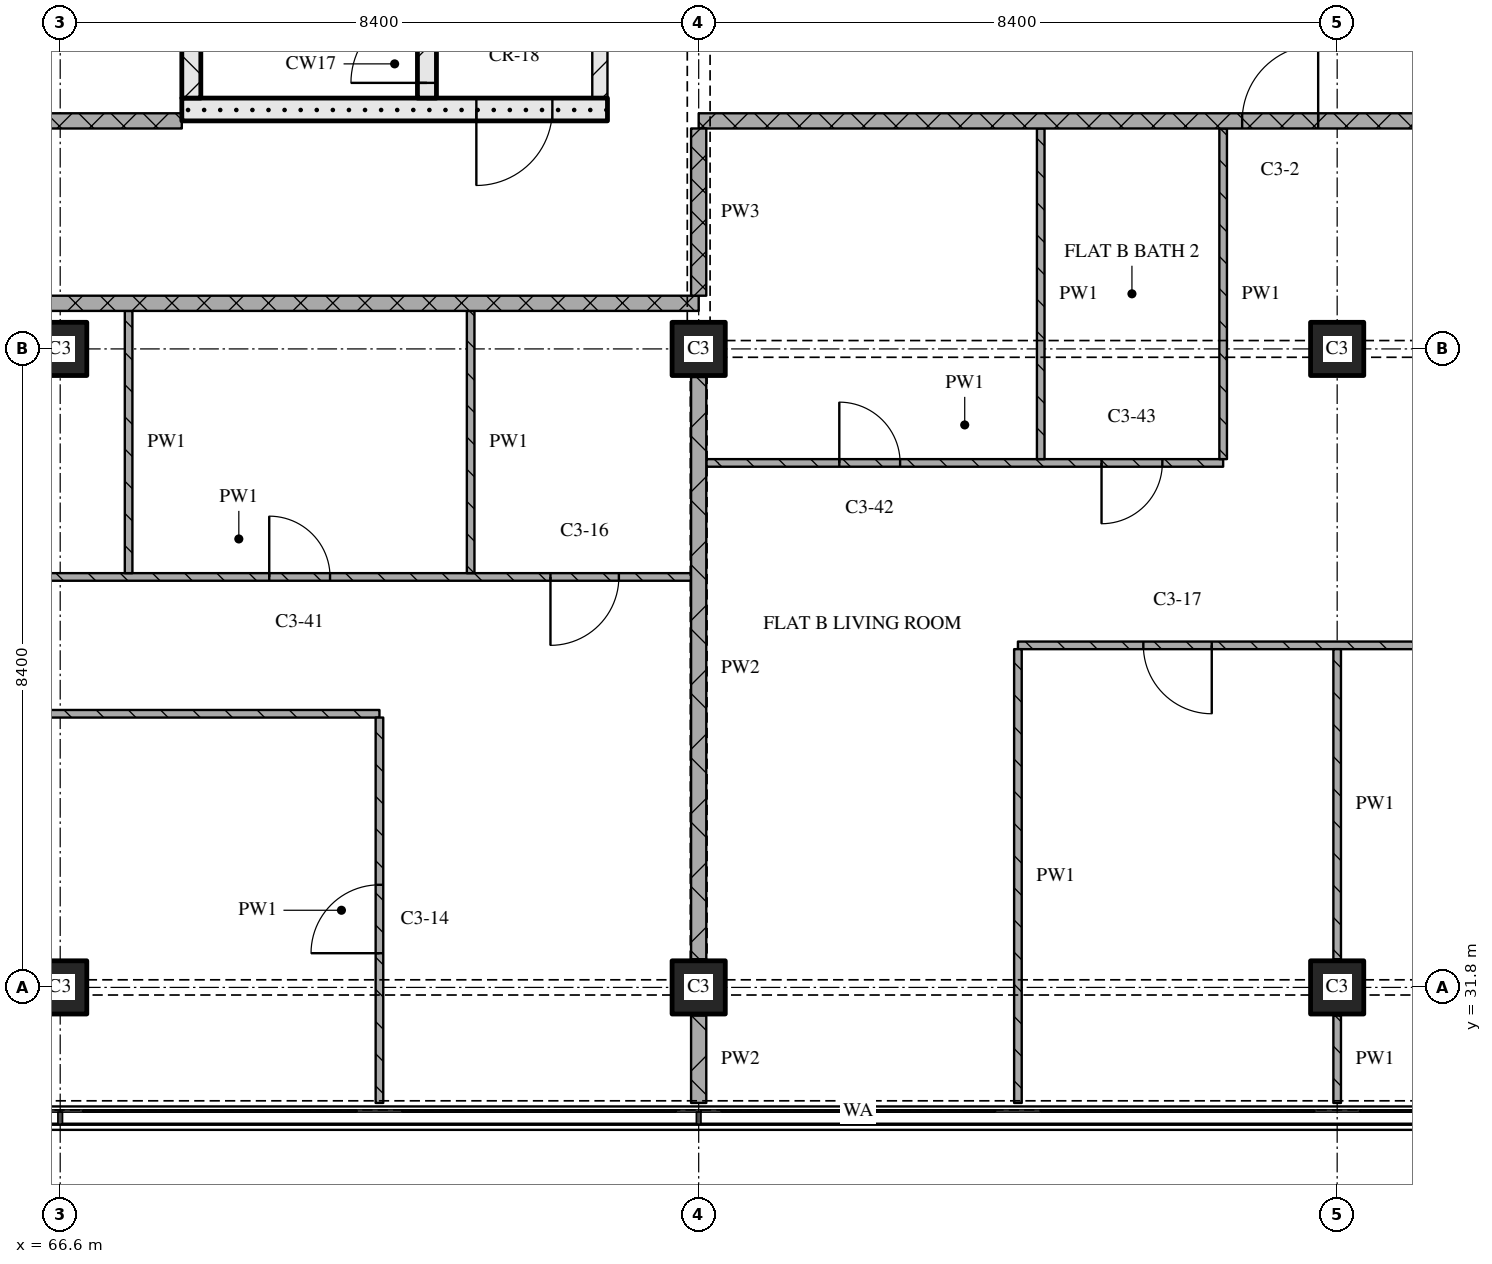
"""IFC4 building model, lengths in metres.
Left out: names, types, materials, properties, quantities, classifications, styles, units other than length and angle.
Written with IfcOpenShell. Run it as: python <this file> out.ifc"""

import sys

from ifc_helpers import new_model, si_unit, direction, frame, frame_2d, origin, origin_2d, place, context, subcontext, project, spatial, rectangle, extrude, element, fill, save


model = new_model("IFC4")
c1 = context("Model", 3, precision=1e-05, world=origin(), true_north=direction((0.0, 1.0)))
c2 = subcontext(c1, "Body", "Model", "MODEL_VIEW")
j1 = project(units=[si_unit("LENGTHUNIT", "METRE"), si_unit("PLANEANGLEUNIT", "RADIAN")], contexts=[c1])
p1 = place(None, origin())
s1 = spatial("IfcSite", under=j1, at=p1, CompositionType="ELEMENT")
p2 = place(p1, origin())
s2 = spatial("IfcBuilding", under=s1, at=p2, CompositionType="ELEMENT")
p3 = place(p2, frame((0.0, 0.0, 172.65)))
s3 = spatial("IfcBuildingStorey", under=s2, at=p3, CompositionType="ELEMENT", Elevation=172.65)
for number, where, z_axis, x_axis in (
    (1, (66.6, 31.8, 0.0), (0.0, 0.0, 1.0), (1.0, 0.0, 0.0)),
    (2, (66.6, 40.2, 0.0), (0.0, 0.0, 1.0), (1.0, 0.0, 0.0)),
    (3, (75.0, 31.8, 0.0), (0.0, 0.0, 1.0), (1.0, 0.0, 0.0)),
    (4, (75.0, 40.2, 0.0), (0.0, 0.0, 1.0), (1.0, 0.0, 0.0)),
    (5, (83.4, 31.8, 0.0), (0.0, 0.0, 1.0), (1.0, 0.0, 0.0)),
    (6, (83.4, 40.2, 0.0), (0.0, 0.0, 1.0), (1.0, 0.0, 0.0)),
):
    element("IfcColumn", number, at=place(p3, frame(where, z_axis=z_axis, x_axis=x_axis)), inside=s3, PredefinedType="COLUMN", context=c2, shape_type="SweptSolid", body=[
        extrude(rectangle(XDim=0.7, YDim=0.7, at=origin_2d()), origin(), (0.0, 0.0, 1.0), 3.6),
    ])
p4 = place(p3, frame((68.2, 43.35, 0.0), z_axis=(0.0, 0.0, 1.0), x_axis=(1.0, 0.0, 0.0)))
e7 = element("IfcWall", 7, at=p4, inside=s3, PredefinedType="SOLIDWALL", context=c2, shape_type="SweptSolid", body=[
    extrude(rectangle(XDim=5.6, YDim=0.3, at=frame_2d((2.8, 0.0))), origin(), (0.0, 0.0, 1.0), 3.32),
])
p5 = place(p4, frame((3.875, 0.0, 0.0)))
e8 = element("IfcOpeningElement", 8, at=p5, cuts=e7, PredefinedType="OPENING", context=c2, shape_type="SweptSolid", body=[
    extrude(rectangle(XDim=1.0, YDim=2.1, at=frame_2d((0.5, 1.05))), frame((0.0, 0.16, 0.0), z_axis=(0.0, -1.0, 0.0), x_axis=(1.0, 0.0, 0.0)), (0.0, 0.0, 1.0), 0.32),
])
p6 = place(p3, frame((68.325, 43.5, 0.0), z_axis=(0.0, 0.0, 1.0), x_axis=(0.0, 1.0, 0.0)))
e9 = element("IfcWall", 9, at=p6, inside=s3, PredefinedType="SOLIDWALL", context=c2, shape_type="SweptSolid", body=[
    extrude(rectangle(XDim=6.9, YDim=0.25, at=frame_2d((3.45, 0.0))), origin(), (0.0, 0.0, 1.0), 3.32),
])
p7 = place(p3, frame((71.425, 43.5, 0.0), z_axis=(0.0, 0.0, 1.0), x_axis=(0.0, 1.0, 0.0)))
e10 = element("IfcWall", 10, at=p7, inside=s3, PredefinedType="SOLIDWALL", context=c2, shape_type="SweptSolid", body=[
    extrude(rectangle(XDim=6.9, YDim=0.25, at=frame_2d((3.45, 0.0))), origin(), (0.0, 0.0, 1.0), 3.32),
])
p8 = place(p7, frame((0.2, 0.0, 0.0)))
e11 = element("IfcOpeningElement", 11, at=p8, cuts=e10, PredefinedType="OPENING", context=c2, shape_type="SweptSolid", body=[
    extrude(rectangle(XDim=1.0, YDim=2.1, at=frame_2d((0.5, 1.05))), frame((0.0, 0.135, 0.0), z_axis=(0.0, -1.0, 0.0), x_axis=(1.0, 0.0, 0.0)), (0.0, 0.0, 1.0), 0.27),
])
p9 = place(p3, frame((73.7, 43.5, 0.0), z_axis=(0.0, 0.0, 1.0), x_axis=(0.0, 1.0, 0.0)))
e12 = element("IfcWall", 12, at=p9, inside=s3, PredefinedType="PARTITIONING", context=c2, shape_type="SweptSolid", body=[
    extrude(rectangle(XDim=6.9, YDim=0.2, at=frame_2d((3.45, 0.0))), origin(), (0.0, 0.0, 1.0), 3.32),
])
p10 = place(p9, frame((1.0, 0.0, 0.0)))
e13 = element("IfcOpeningElement", 13, at=p10, cuts=e12, PredefinedType="OPENING", context=c2, shape_type="SweptSolid", body=[
    extrude(rectangle(XDim=1.0, YDim=2.1, at=frame_2d((0.5, 1.05))), frame((0.0, 0.11, 0.0), z_axis=(0.0, -1.0, 0.0), x_axis=(1.0, 0.0, 0.0)), (0.0, 0.0, 1.0), 0.22),
])
p11 = place(p3, frame((70.8, 35.4, 0.0), z_axis=(0.0, 0.0, 1.0), x_axis=(-1.0, 0.0, 0.0)))
e14 = element("IfcWall", 14, at=p11, inside=s3, PredefinedType="PARTITIONING", context=c2, shape_type="SweptSolid", body=[
    extrude(rectangle(XDim=22.52, YDim=0.1, at=frame_2d((11.26, 0.0))), origin(), (0.0, 0.0, 1.0), 3.32),
])
p12 = place(p11, frame((10.05, 0.0, 0.0)))
e15 = element("IfcOpeningElement", 15, at=p12, cuts=e14, PredefinedType="OPENING", context=c2, shape_type="SweptSolid", body=[
    extrude(rectangle(XDim=0.9, YDim=2.1, at=frame_2d((0.45, 1.05))), frame((0.0, 0.06, 0.0), z_axis=(0.0, -1.0, 0.0), x_axis=(1.0, 0.0, 0.0)), (0.0, 0.0, 1.0), 0.12),
])
p13 = place(p11, frame((14.25, 0.0, 0.0)))
e16 = element("IfcOpeningElement", 16, at=p13, cuts=e14, PredefinedType="OPENING", context=c2, shape_type="SweptSolid", body=[
    extrude(rectangle(XDim=0.9, YDim=2.1, at=frame_2d((0.45, 1.05))), frame((0.0, 0.06, 0.0), z_axis=(0.0, -1.0, 0.0), x_axis=(1.0, 0.0, 0.0)), (0.0, 0.0, 1.0), 0.12),
])
p14 = place(p11, frame((18.274, 0.0, 0.0)))
e17 = element("IfcOpeningElement", 17, at=p14, cuts=e14, PredefinedType="OPENING", context=c2, shape_type="SweptSolid", body=[
    extrude(rectangle(XDim=0.9, YDim=2.1, at=frame_2d((0.45, 1.05))), frame((0.0, 0.06, 0.0), z_axis=(0.0, -1.0, 0.0), x_axis=(1.0, 0.0, 0.0)), (0.0, 0.0, 1.0), 0.12),
])
p15 = place(p3, frame((91.7, 36.3, 0.0), z_axis=(0.0, 0.0, 1.0), x_axis=(-1.0, 0.0, 0.0)))
e18 = element("IfcWall", 18, at=p15, inside=s3, PredefinedType="PARTITIONING", context=c2, shape_type="SweptSolid", body=[
    extrude(rectangle(XDim=12.5, YDim=0.1, at=frame_2d((6.25, 0.0))), origin(), (0.0, 0.0, 1.0), 3.32),
])
p16 = place(p15, frame((3.65, 0.0, 0.0)))
e19 = element("IfcOpeningElement", 19, at=p16, cuts=e18, PredefinedType="OPENING", context=c2, shape_type="SweptSolid", body=[
    extrude(rectangle(XDim=0.9, YDim=2.1, at=frame_2d((0.45, 1.05))), frame((0.0, 0.06, 0.0), z_axis=(0.0, -1.0, 0.0), x_axis=(1.0, 0.0, 0.0)), (0.0, 0.0, 1.0), 0.12),
])
p17 = place(p15, frame((9.95, 0.0, 0.0)))
e20 = element("IfcOpeningElement", 20, at=p17, cuts=e18, PredefinedType="OPENING", context=c2, shape_type="SweptSolid", body=[
    extrude(rectangle(XDim=0.9, YDim=2.1, at=frame_2d((0.45, 1.05))), frame((0.0, 0.06, 0.0), z_axis=(0.0, -1.0, 0.0), x_axis=(1.0, 0.0, 0.0)), (0.0, 0.0, 1.0), 0.12),
])
p18 = place(p3, frame((63.0, 37.2, 0.0), z_axis=(0.0, 0.0, 1.0), x_axis=(1.0, 0.0, 0.0)))
e21 = element("IfcWall", 21, at=p18, inside=s3, PredefinedType="PARTITIONING", context=c2, shape_type="SweptSolid", body=[
    extrude(rectangle(XDim=11.9, YDim=0.1, at=frame_2d((5.95, 0.0))), origin(), (0.0, 0.0, 1.0), 3.32),
])
p19 = place(p18, frame((6.35, 0.0, 0.0)))
e22 = element("IfcOpeningElement", 22, at=p19, cuts=e21, PredefinedType="OPENING", context=c2, shape_type="SweptSolid", body=[
    extrude(rectangle(XDim=0.8, YDim=2.1, at=frame_2d((0.4, 1.05))), frame((0.0, 0.06, 0.0), z_axis=(0.0, -1.0, 0.0), x_axis=(1.0, 0.0, 0.0)), (0.0, 0.0, 1.0), 0.12),
])
p20 = place(p18, frame((10.05, 0.0, 0.0)))
e23 = element("IfcOpeningElement", 23, at=p20, cuts=e21, PredefinedType="OPENING", context=c2, shape_type="SweptSolid", body=[
    extrude(rectangle(XDim=0.9, YDim=2.1, at=frame_2d((0.45, 1.05))), frame((0.0, 0.06, 0.0), z_axis=(0.0, -1.0, 0.0), x_axis=(1.0, 0.0, 0.0)), (0.0, 0.0, 1.0), 0.12),
])
p21 = place(p3, frame((75.1, 38.7, 0.0), z_axis=(0.0, 0.0, 1.0), x_axis=(1.0, 0.0, 0.0)))
e24 = element("IfcWall", 24, at=p21, inside=s3, PredefinedType="PARTITIONING", context=c2, shape_type="SweptSolid", body=[
    extrude(rectangle(XDim=6.8, YDim=0.1, at=frame_2d((3.4, 0.0))), origin(), (0.0, 0.0, 1.0), 3.32),
])
p22 = place(p21, frame((1.75, 0.0, 0.0)))
e25 = element("IfcOpeningElement", 25, at=p22, cuts=e24, PredefinedType="OPENING", context=c2, shape_type="SweptSolid", body=[
    extrude(rectangle(XDim=0.8, YDim=2.1, at=frame_2d((0.4, 1.05))), frame((0.0, 0.06, 0.0), z_axis=(0.0, -1.0, 0.0), x_axis=(1.0, 0.0, 0.0)), (0.0, 0.0, 1.0), 0.12),
])
p23 = place(p21, frame((5.2, 0.0, 0.0)))
e26 = element("IfcOpeningElement", 26, at=p23, cuts=e24, PredefinedType="OPENING", context=c2, shape_type="SweptSolid", body=[
    extrude(rectangle(XDim=0.8, YDim=2.1, at=frame_2d((0.4, 1.05))), frame((0.0, 0.06, 0.0), z_axis=(0.0, -1.0, 0.0), x_axis=(1.0, 0.0, 0.0)), (0.0, 0.0, 1.0), 0.12),
])
p24 = place(p3, frame((75.0, 40.8, 0.0), z_axis=(0.0, 0.0, 1.0), x_axis=(-1.0, 0.0, 0.0)))
e27 = element("IfcWall", 27, at=p24, inside=s3, PredefinedType="PARTITIONING", context=c2, shape_type="SweptSolid", body=[
    extrude(rectangle(XDim=24.28, YDim=0.2, at=frame_2d((12.14, 0.0))), origin(), (0.0, 0.0, 1.0), 3.32),
])
p25 = place(p24, frame((12.25, 0.0, 0.0)))
e28 = element("IfcOpeningElement", 28, at=p25, cuts=e27, PredefinedType="OPENING", context=c2, shape_type="SweptSolid", body=[
    extrude(rectangle(XDim=1.0, YDim=2.1, at=frame_2d((0.5, 1.05))), frame((0.0, 0.11, 0.0), z_axis=(0.0, -1.0, 0.0), x_axis=(1.0, 0.0, 0.0)), (0.0, 0.0, 1.0), 0.22),
])
p26 = place(p3, frame((63.0, 43.2, 0.0), z_axis=(0.0, 0.0, 1.0), x_axis=(1.0, 0.0, 0.0)))
e29 = element("IfcWall", 29, at=p26, inside=s3, PredefinedType="PARTITIONING", context=c2, shape_type="SweptSolid", body=[
    extrude(rectangle(XDim=5.2, YDim=0.2, at=frame_2d((2.6, 0.0))), origin(), (0.0, 0.0, 1.0), 3.32),
])
p27 = place(p3, frame((100.2, 43.2, 0.0), z_axis=(0.0, 0.0, 1.0), x_axis=(-1.0, 0.0, 0.0)))
e30 = element("IfcWall", 30, at=p27, inside=s3, PredefinedType="PARTITIONING", context=c2, shape_type="SweptSolid", body=[
    extrude(rectangle(XDim=25.2, YDim=0.2, at=frame_2d((12.6, 0.0))), origin(), (0.0, 0.0, 1.0), 3.32),
])
p28 = place(p27, frame((4.45, 0.0, 0.0)))
e31 = element("IfcOpeningElement", 31, at=p28, cuts=e30, PredefinedType="OPENING", context=c2, shape_type="SweptSolid", body=[
    extrude(rectangle(XDim=1.0, YDim=2.1, at=frame_2d((0.5, 1.05))), frame((0.0, 0.11, 0.0), z_axis=(0.0, -1.0, 0.0), x_axis=(1.0, 0.0, 0.0)), (0.0, 0.0, 1.0), 0.22),
])
p29 = place(p27, frame((17.05, 0.0, 0.0)))
e32 = element("IfcOpeningElement", 32, at=p29, cuts=e30, PredefinedType="OPENING", context=c2, shape_type="SweptSolid", body=[
    extrude(rectangle(XDim=1.0, YDim=2.1, at=frame_2d((0.5, 1.05))), frame((0.0, 0.11, 0.0), z_axis=(0.0, -1.0, 0.0), x_axis=(1.0, 0.0, 0.0)), (0.0, 0.0, 1.0), 0.22),
])
p30 = place(p3, frame((67.5, 40.7, 0.0), z_axis=(0.0, 0.0, 1.0), x_axis=(0.0, -1.0, 0.0)))
e33 = element("IfcWall", 33, at=p30, inside=s3, PredefinedType="PARTITIONING", context=c2, shape_type="SweptSolid", body=[
    extrude(rectangle(XDim=3.45, YDim=0.1, at=frame_2d((1.725, 0.0))), origin(), (0.0, 0.0, 1.0), 3.32),
])
p31 = place(p3, frame((70.8, 30.28, 0.0), z_axis=(0.0, 0.0, 1.0), x_axis=(0.0, 1.0, 0.0)))
e34 = element("IfcWall", 34, at=p31, inside=s3, PredefinedType="PARTITIONING", context=c2, shape_type="SweptSolid", body=[
    extrude(rectangle(XDim=5.07, YDim=0.1, at=frame_2d((2.535, 0.0))), origin(), (0.0, 0.0, 1.0), 3.32),
])
p32 = place(p31, frame((1.97, 0.0, 0.0)))
e35 = element("IfcOpeningElement", 35, at=p32, cuts=e34, PredefinedType="OPENING", context=c2, shape_type="SweptSolid", body=[
    extrude(rectangle(XDim=0.9, YDim=2.1, at=frame_2d((0.45, 1.05))), frame((0.0, 0.06, 0.0), z_axis=(0.0, -1.0, 0.0), x_axis=(1.0, 0.0, 0.0)), (0.0, 0.0, 1.0), 0.12),
])
p33 = place(p3, frame((72.0, 40.7, 0.0), z_axis=(0.0, 0.0, 1.0), x_axis=(0.0, -1.0, 0.0)))
e36 = element("IfcWall", 36, at=p33, inside=s3, PredefinedType="PARTITIONING", context=c2, shape_type="SweptSolid", body=[
    extrude(rectangle(XDim=3.45, YDim=0.1, at=frame_2d((1.725, 0.0))), origin(), (0.0, 0.0, 1.0), 3.32),
])
p34 = place(p3, frame((75.0, 43.1, 0.0), z_axis=(0.0, 0.0, 1.0), x_axis=(0.0, -1.0, 0.0)))
e37 = element("IfcWall", 37, at=p34, inside=s3, PredefinedType="PARTITIONING", context=c2, shape_type="SweptSolid", body=[
    extrude(rectangle(XDim=2.2, YDim=0.2, at=frame_2d((1.1, 0.0))), origin(), (0.0, 0.0, 1.0), 2.43),
])
p35 = place(p3, frame((75.0, 31.43, 0.0), z_axis=(0.0, 0.0, 1.0), x_axis=(0.0, -1.0, 0.0)))
e38 = element("IfcWall", 38, at=p35, inside=s3, PredefinedType="PARTITIONING", context=c2, shape_type="SweptSolid", body=[
    extrude(rectangle(XDim=1.15, YDim=0.2, at=frame_2d((0.575, 0.0))), origin(), (0.0, 0.0, 1.0), 3.32),
])
p36 = place(p3, frame((75.0, 39.83, 0.0), z_axis=(0.0, 0.0, 1.0), x_axis=(0.0, -1.0, 0.0)))
e39 = element("IfcWall", 39, at=p36, inside=s3, PredefinedType="PARTITIONING", context=c2, shape_type="SweptSolid", body=[
    extrude(rectangle(XDim=7.66, YDim=0.2, at=frame_2d((3.83, 0.0))), origin(), (0.0, 0.0, 1.0), 2.72),
])
p37 = place(p3, frame((79.2, 36.25, 0.0), z_axis=(0.0, 0.0, 1.0), x_axis=(0.0, -1.0, 0.0)))
e40 = element("IfcWall", 40, at=p37, inside=s3, PredefinedType="PARTITIONING", context=c2, shape_type="SweptSolid", body=[
    extrude(rectangle(XDim=5.97, YDim=0.1, at=frame_2d((2.985, 0.0))), origin(), (0.0, 0.0, 1.0), 3.32),
])
for number, where, z_axis, x_axis in (
    (41, (79.5, 43.1, 0.0), (0.0, 0.0, 1.0), (0.0, -1.0, 0.0)),
    (42, (81.9, 43.1, 0.0), (0.0, 0.0, 1.0), (0.0, -1.0, 0.0)),
):
    element("IfcWall", number, at=place(p3, frame(where, z_axis=z_axis, x_axis=x_axis)), inside=s3, PredefinedType="PARTITIONING", context=c2, shape_type="SweptSolid", body=[
        extrude(rectangle(XDim=4.35, YDim=0.1, at=frame_2d((2.175, 0.0))), origin(), (0.0, 0.0, 1.0), 3.32),
    ])
p38 = place(p3, frame((83.4, 31.43, 0.0), z_axis=(0.0, 0.0, 1.0), x_axis=(0.0, -1.0, 0.0)))
e43 = element("IfcWall", 43, at=p38, inside=s3, PredefinedType="PARTITIONING", context=c2, shape_type="SweptSolid", body=[
    extrude(rectangle(XDim=1.15, YDim=0.1, at=frame_2d((0.575, 0.0))), origin(), (0.0, 0.0, 1.0), 3.32),
])
p39 = place(p3, frame((83.4, 36.25, 0.0), z_axis=(0.0, 0.0, 1.0), x_axis=(0.0, -1.0, 0.0)))
e44 = element("IfcWall", 44, at=p39, inside=s3, PredefinedType="PARTITIONING", context=c2, shape_type="SweptSolid", body=[
    extrude(rectangle(XDim=4.08, YDim=0.1, at=frame_2d((2.04, 0.0))), origin(), (0.0, 0.0, 1.0), 3.32),
])
p40 = place(p5, origin())
e45 = element("IfcDoor", 45, at=p40, inside=s3, OperationType="SINGLE_SWING_RIGHT", PredefinedType="DOOR", context=c2, shape_type="SweptSolid", body=[
    extrude(rectangle(XDim=1.0, YDim=2.1, at=frame_2d((0.5, 1.05))), frame((0.0, 0.025, 0.0), z_axis=(0.0, -1.0, 0.0), x_axis=(1.0, 0.0, 0.0)), (0.0, 0.0, 1.0), 0.05),
])
fill(e8, e45)
p41 = place(p8, origin())
e46 = element("IfcDoor", 46, at=p41, inside=s3, OperationType="SINGLE_SWING_LEFT", PredefinedType="DOOR", context=c2, shape_type="SweptSolid", body=[
    extrude(rectangle(XDim=1.0, YDim=2.1, at=frame_2d((0.5, 1.05))), frame((0.0, 0.025, 0.0), z_axis=(0.0, -1.0, 0.0), x_axis=(1.0, 0.0, 0.0)), (0.0, 0.0, 1.0), 0.05),
])
fill(e11, e46)
p42 = place(p17, origin())
e47 = element("IfcDoor", 47, at=p42, inside=s3, OperationType="SINGLE_SWING_LEFT", PredefinedType="DOOR", context=c2, shape_type="SweptSolid", body=[
    extrude(rectangle(XDim=0.9, YDim=2.1, at=frame_2d((0.45, 1.05))), frame((0.0, 0.025, 0.0), z_axis=(0.0, -1.0, 0.0), x_axis=(1.0, 0.0, 0.0)), (0.0, 0.0, 1.0), 0.05),
])
fill(e20, e47)
p43 = place(p19, origin())
e48 = element("IfcDoor", 48, at=p43, inside=s3, OperationType="SINGLE_SWING_LEFT", PredefinedType="DOOR", context=c2, shape_type="SweptSolid", body=[
    extrude(rectangle(XDim=0.8, YDim=2.1, at=frame_2d((0.4, 1.05))), frame((0.0, 0.025, 0.0), z_axis=(0.0, -1.0, 0.0), x_axis=(1.0, 0.0, 0.0)), (0.0, 0.0, 1.0), 0.05),
])
fill(e22, e48)
p44 = place(p20, origin())
e49 = element("IfcDoor", 49, at=p44, inside=s3, OperationType="SINGLE_SWING_RIGHT", PredefinedType="DOOR", context=c2, shape_type="SweptSolid", body=[
    extrude(rectangle(XDim=0.9, YDim=2.1, at=frame_2d((0.45, 1.05))), frame((0.0, 0.025, 0.0), z_axis=(0.0, -1.0, 0.0), x_axis=(1.0, 0.0, 0.0)), (0.0, 0.0, 1.0), 0.05),
])
fill(e23, e49)
p45 = place(p22, origin())
e50 = element("IfcDoor", 50, at=p45, inside=s3, OperationType="SINGLE_SWING_LEFT", PredefinedType="DOOR", context=c2, shape_type="SweptSolid", body=[
    extrude(rectangle(XDim=0.8, YDim=2.1, at=frame_2d((0.4, 1.05))), frame((0.0, 0.025, 0.0), z_axis=(0.0, -1.0, 0.0), x_axis=(1.0, 0.0, 0.0)), (0.0, 0.0, 1.0), 0.05),
])
fill(e25, e50)
p46 = place(p23, origin())
e51 = element("IfcDoor", 51, at=p46, inside=s3, OperationType="SINGLE_SWING_RIGHT", PredefinedType="DOOR", context=c2, shape_type="SweptSolid", body=[
    extrude(rectangle(XDim=0.8, YDim=2.1, at=frame_2d((0.4, 1.05))), frame((0.0, 0.025, 0.0), z_axis=(0.0, -1.0, 0.0), x_axis=(1.0, 0.0, 0.0)), (0.0, 0.0, 1.0), 0.05),
])
fill(e26, e51)
p47 = place(p29, origin())
e52 = element("IfcDoor", 52, at=p47, inside=s3, OperationType="SINGLE_SWING_RIGHT", PredefinedType="DOOR", context=c2, shape_type="SweptSolid", body=[
    extrude(rectangle(XDim=1.0, YDim=2.1, at=frame_2d((0.5, 1.05))), frame((0.0, 0.025, 0.0), z_axis=(0.0, -1.0, 0.0), x_axis=(1.0, 0.0, 0.0)), (0.0, 0.0, 1.0), 0.05),
])
fill(e32, e52)
p48 = place(p32, origin())
e53 = element("IfcDoor", 53, at=p48, inside=s3, OperationType="SINGLE_SWING_LEFT", PredefinedType="DOOR", context=c2, shape_type="SweptSolid", body=[
    extrude(rectangle(XDim=0.9, YDim=2.1, at=frame_2d((0.45, 1.05))), frame((0.0, 0.025, 0.0), z_axis=(0.0, -1.0, 0.0), x_axis=(1.0, 0.0, 0.0)), (0.0, 0.0, 1.0), 0.05),
])
fill(e35, e53)
save(model, sys.argv[1])
